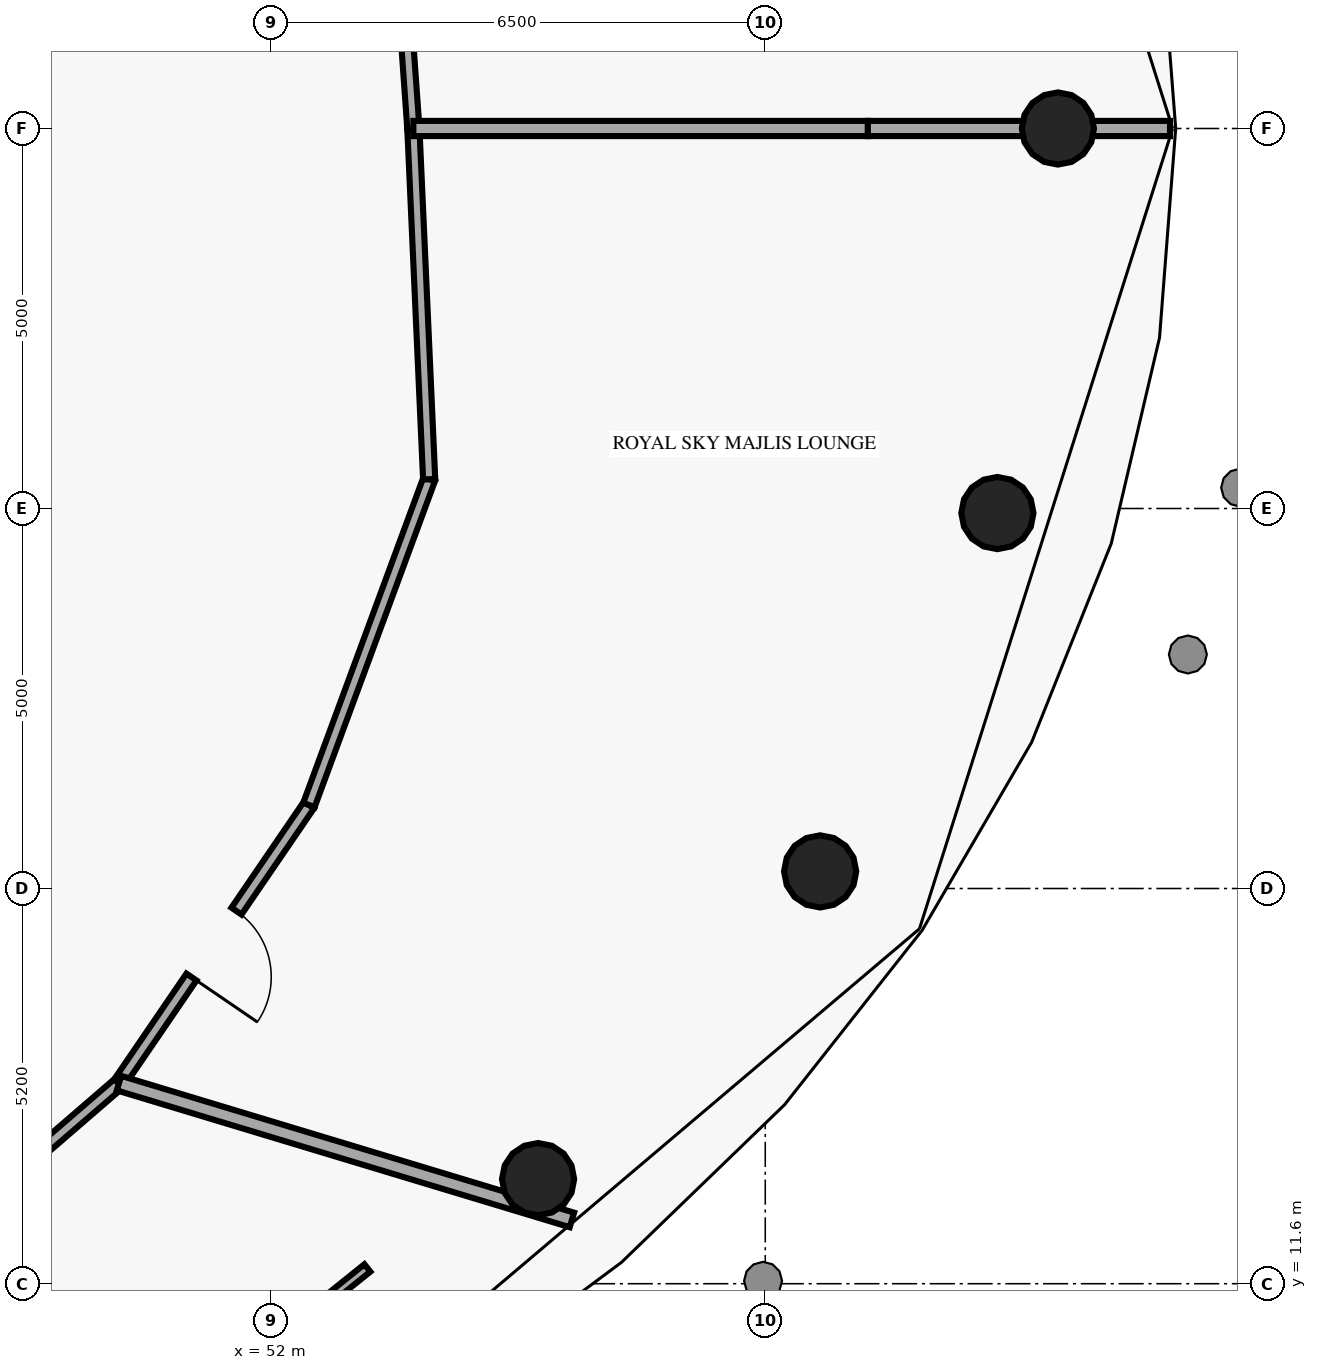
"""IFC4 building model, lengths in metres.
Left out: names, types, materials, properties, quantities, classifications, styles, units other than length and angle.
Written with IfcOpenShell. Run it as: python <this file> out.ifc"""

import sys

from ifc_helpers import new_model, si_unit, direction, frame, frame_2d, origin, origin_2d, place, context, subcontext, project, spatial, rectangle, circle, extrude, element, fill, save


model = new_model("IFC4")
c1 = context("Model", 3, precision=1e-05, world=origin(), true_north=direction((0.0, 1.0)))
c2 = subcontext(c1, "Body", "Model", "MODEL_VIEW")
j1 = project(units=[si_unit("LENGTHUNIT", "METRE"), si_unit("PLANEANGLEUNIT", "RADIAN")], contexts=[c1])
p1 = place(None, origin())
s1 = spatial("IfcSite", under=j1, at=p1, CompositionType="ELEMENT")
p2 = place(p1, origin())
s2 = spatial("IfcBuilding", under=s1, at=p2, CompositionType="ELEMENT")
p3 = place(p2, frame((0.0, 0.0, 192.25)))
s3 = spatial("IfcBuildingStorey", under=s2, at=p3, CompositionType="ELEMENT", Elevation=192.25)
for number, where, z_axis, x_axis in (
    (1, (62.35, 26.8, 0.0), (0.0, 0.0, 1.0), (1.0, 0.0, 0.0)),
    (2, (55.511, 12.976, 0.0), (0.0, 0.0, 1.0), (1.0, 0.0, 0.0)),
    (3, (59.222, 17.025, 0.0), (0.0, 0.0, 1.0), (1.0, 0.0, 0.0)),
    (4, (61.554, 21.74, 0.0), (0.0, 0.0, 1.0), (1.0, 0.0, 0.0)),
):
    element("IfcColumn", number, at=place(p3, frame(where, z_axis=z_axis, x_axis=x_axis)), inside=s3, PredefinedType="COLUMN", context=c2, shape_type="SweptSolid", body=[
        extrude(circle(Radius=0.475, at=origin_2d()), origin(), (0.0, 0.0, 1.0), 3.35),
    ])
p4 = place(p3, frame((46.761, 11.445, 0.0), z_axis=(0.0, 0.0, 1.0), x_axis=(0.756921867837, 0.653505383291, 0.0)))
e5 = element("IfcWall", 5, at=p4, inside=s3, PredefinedType="PARTITIONING", context=c2, shape_type="SweptSolid", body=[
    extrude(rectangle(XDim=4.275, YDim=0.16, at=frame_2d((2.138, 0.0))), origin(), (0.0, 0.0, 1.0), 3.35),
])
p5 = place(p3, frame((52.496, 17.899, 0.0), z_axis=(0.0, 0.0, 1.0), x_axis=(-0.563895671103, -0.825846034144, 0.0)))
e6 = element("IfcWall", 6, at=p5, inside=s3, PredefinedType="PARTITIONING", context=c2, shape_type="SweptSolid", body=[
    extrude(rectangle(XDim=4.432, YDim=0.16, at=frame_2d((2.216, 0.0))), origin(), (0.0, 0.0, 1.0), 3.35),
])
p6 = place(p5, frame((1.691, 0.0, 0.0)))
e7 = element("IfcOpeningElement", 7, at=p6, cuts=e6, PredefinedType="OPENING", context=c2, shape_type="SweptSolid", body=[
    extrude(rectangle(XDim=1.05, YDim=2.15, at=frame_2d((0.525, 1.075))), frame((0.0, 0.09, 0.0), z_axis=(0.0, -1.0, 0.0), x_axis=(1.0, 0.0, 0.0)), (0.0, 0.0, 1.0), 0.18),
])
p7 = place(p3, frame((52.496, 17.899, 0.0), z_axis=(0.0, 0.0, 1.0), x_axis=(0.346222869932, 0.93815229272, 0.0)))
e8 = element("IfcWall", 8, at=p7, inside=s3, PredefinedType="PARTITIONING", context=c2, shape_type="SweptSolid", body=[
    extrude(rectangle(XDim=4.569, YDim=0.16, at=frame_2d((2.284, 0.0))), origin(), (0.0, 0.0, 1.0), 3.35),
])
p8 = place(p3, frame((54.078, 22.185, 0.0), z_axis=(0.0, 0.0, 1.0), x_axis=(-0.044973757158, 0.998988168682, 0.0)))
e9 = element("IfcWall", 9, at=p8, inside=s3, PredefinedType="PARTITIONING", context=c2, shape_type="SweptSolid", body=[
    extrude(rectangle(XDim=4.62, YDim=0.16, at=frame_2d((2.31, 0.0))), origin(), (0.0, 0.0, 1.0), 3.35),
])
p9 = place(p3, frame((53.552, 31.254, 0.0), z_axis=(0.0, 0.0, 1.0), x_axis=(0.071243164365, -0.997458977368, 0.0)))
e10 = element("IfcWall", 10, at=p9, inside=s3, PredefinedType="PARTITIONING", context=c2, shape_type="SweptSolid", body=[
    extrude(rectangle(XDim=4.465, YDim=0.16, at=frame_2d((2.232, 0.0))), origin(), (0.0, 0.0, 1.0), 3.35),
])
p10 = place(p9, frame((1.708, 0.0, 0.0)))
e11 = element("IfcOpeningElement", 11, at=p10, cuts=e10, PredefinedType="OPENING", context=c2, shape_type="SweptSolid", body=[
    extrude(rectangle(XDim=1.05, YDim=2.15, at=frame_2d((0.525, 1.075))), frame((0.0, 0.09, 0.0), z_axis=(0.0, -1.0, 0.0), x_axis=(1.0, 0.0, 0.0)), (0.0, 0.0, 1.0), 0.18),
])
p11 = place(p3, frame((50.735, 9.776, 0.0), z_axis=(0.0, 0.0, 1.0), x_axis=(0.779788382675, 0.626043191997, 0.0)))
e12 = element("IfcWall", 12, at=p11, inside=s3, PredefinedType="PARTITIONING", context=c2, shape_type="SweptSolid", body=[
    extrude(rectangle(XDim=3.244, YDim=0.125, at=frame_2d((1.622, 0.0))), origin(), (0.0, 0.0, 1.0), 2.73),
])
p12 = place(p3, frame((49.997, 14.239, 0.0), z_axis=(0.0, 0.0, 1.0), x_axis=(0.957278355307, -0.289168031534, 0.0)))
e13 = element("IfcWall", 13, at=p12, inside=s3, PredefinedType="PARTITIONING", context=c2, shape_type="SweptSolid", body=[
    extrude(rectangle(XDim=6.225, YDim=0.2, at=frame_2d((3.112, 0.0))), origin(), (0.0, 0.0, 1.0), 3.35),
])
p13 = place(p3, frame((53.87, 26.8, 0.0), z_axis=(0.0, 0.0, 1.0), x_axis=(1.0, 0.0, 0.0)))
e14 = element("IfcWall", 14, at=p13, inside=s3, PredefinedType="PARTITIONING", context=c2, shape_type="SweptSolid", body=[
    extrude(rectangle(XDim=5.98, YDim=0.2, at=frame_2d((2.99, 0.0))), origin(), (0.0, 0.0, 1.0), 3.35),
])
p14 = place(p3, frame((59.85, 26.8, 0.0), z_axis=(0.0, 0.0, 1.0), x_axis=(1.0, 0.0, 0.0)))
e15 = element("IfcWall", 15, at=p14, inside=s3, PredefinedType="PARTITIONING", context=c2, shape_type="SweptSolid", body=[
    extrude(rectangle(XDim=2.512, YDim=0.2, at=frame_2d((1.256, 0.0))), origin(), (0.0, 0.0, 1.0), 2.31),
])
p15 = place(p3, frame((62.362, 26.8, 0.0), z_axis=(0.0, 0.0, 1.0), x_axis=(1.0, 0.0, 0.0)))
e16 = element("IfcWall", 16, at=p15, inside=s3, PredefinedType="PARTITIONING", context=c2, shape_type="SweptSolid", body=[
    extrude(rectangle(XDim=1.463, YDim=0.2, at=frame_2d((0.731, 0.0))), origin(), (0.0, 0.0, 1.0), 3.35),
])
p16 = place(p6, origin())
e17 = element("IfcDoor", 17, at=p16, inside=s3, OperationType="SINGLE_SWING_RIGHT", PredefinedType="DOOR", context=c2, shape_type="SweptSolid", body=[
    extrude(rectangle(XDim=1.05, YDim=2.15, at=frame_2d((0.525, 1.075))), frame((0.0, 0.025, 0.0), z_axis=(0.0, -1.0, 0.0), x_axis=(1.0, 0.0, 0.0)), (0.0, 0.0, 1.0), 0.05),
])
fill(e7, e17)
save(model, sys.argv[1])
